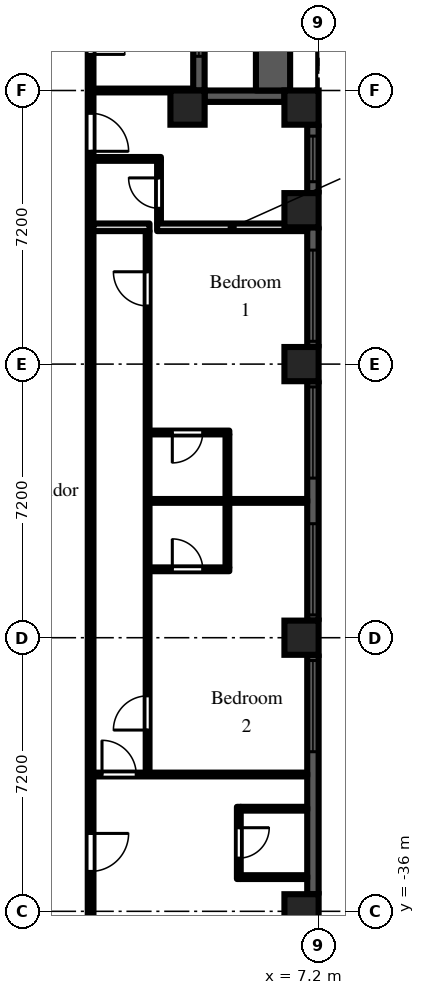
"""IFC4 building model, lengths in metres.
Left out: names, types, materials, properties, quantities, classifications, styles, units other than length and angle.
Written with IfcOpenShell. Run it as: python <this file> out.ifc"""

import sys

from ifc_helpers import new_model, si_unit, direction, frame, frame_2d, origin, origin_2d, place, context, subcontext, project, spatial, rectangle, extrude, element, fill, save


model = new_model("IFC4")
c1 = context("Model", 3, precision=1e-05, world=origin(), true_north=direction((0.0, 1.0)))
c2 = subcontext(c1, "Body", "Model", "MODEL_VIEW")
j1 = project(units=[si_unit("LENGTHUNIT", "METRE"), si_unit("PLANEANGLEUNIT", "RADIAN")], contexts=[c1])
p1 = place(None, origin())
s1 = spatial("IfcSite", under=j1, at=p1, CompositionType="ELEMENT")
p2 = place(p1, origin())
s2 = spatial("IfcBuilding", under=s1, at=p2, CompositionType="ELEMENT")
p3 = place(p2, frame((0.0, 0.0, 84.9)))
s3 = spatial("IfcBuildingStorey", under=s2, at=p3, CompositionType="ELEMENT", Elevation=84.9)
for number, where, z_axis, x_axis in (
    (1, (3.75, -14.85, 0.0), (0.0, 0.0, 1.0), (1.0, 0.0, 0.0)),
    (2, (6.75, -36.0, 0.0), (0.0, 0.0, 1.0), (1.0, 0.0, 0.0)),
    (3, (6.75, -28.8, 0.0), (0.0, 0.0, 1.0), (1.0, 0.0, 0.0)),
    (4, (6.75, -21.6, 0.0), (0.0, 0.0, 1.0), (1.0, 0.0, 0.0)),
    (5, (6.75, -17.55, 0.0), (0.0, 0.0, 1.0), (1.0, 0.0, 0.0)),
    (6, (6.75, -14.85, 0.0), (0.0, 0.0, 1.0), (1.0, 0.0, 0.0)),
):
    element("IfcColumn", number, at=place(p3, frame(where, z_axis=z_axis, x_axis=x_axis)), inside=s3, PredefinedType="COLUMN", context=c2, shape_type="SweptSolid", body=[
        extrude(rectangle(XDim=0.9, YDim=0.9, at=origin_2d()), origin(), (0.0, 0.0, 1.0), 3.0),
    ])
p4 = place(p3, frame((7.05, -35.55, 0.0), z_axis=(0.0, 0.0, 1.0), x_axis=(0.0, 1.0, 0.0)))
e7 = element("IfcWall", 7, at=p4, inside=s3, PredefinedType="SOLIDWALL", context=c2, shape_type="SweptSolid", body=[
    extrude(rectangle(XDim=6.3, YDim=0.3, at=frame_2d((3.15, 0.0))), origin(), (0.0, 0.0, 1.0), 2.1),
])
p5 = place(p4, frame((3.75, 0.0, 0.2)))
e8 = element("IfcOpeningElement", 8, at=p5, cuts=e7, PredefinedType="OPENING", context=c2, shape_type="SweptSolid", body=[
    extrude(rectangle(XDim=2.4, YDim=1.85, at=frame_2d((1.2, 0.925))), frame((0.0, 0.16, 0.0), z_axis=(0.0, -1.0, 0.0), x_axis=(1.0, 0.0, 0.0)), (0.0, 0.0, 1.0), 0.32),
])
p6 = place(p3, frame((7.05, -28.35, 0.0), z_axis=(0.0, 0.0, 1.0), x_axis=(0.0, 1.0, 0.0)))
e9 = element("IfcWall", 9, at=p6, inside=s3, PredefinedType="SOLIDWALL", context=c2, shape_type="SweptSolid", body=[
    extrude(rectangle(XDim=6.3, YDim=0.3, at=frame_2d((3.15, 0.0))), origin(), (0.0, 0.0, 1.0), 2.1),
])
p7 = place(p6, frame((0.15, 0.0, 0.2)))
e10 = element("IfcOpeningElement", 10, at=p7, cuts=e9, PredefinedType="OPENING", context=c2, shape_type="SweptSolid", body=[
    extrude(rectangle(XDim=2.4, YDim=1.85, at=frame_2d((1.2, 0.925))), frame((0.0, 0.16, 0.0), z_axis=(0.0, -1.0, 0.0), x_axis=(1.0, 0.0, 0.0)), (0.0, 0.0, 1.0), 0.32),
])
p8 = place(p6, frame((3.75, 0.0, 0.2)))
e11 = element("IfcOpeningElement", 11, at=p8, cuts=e9, PredefinedType="OPENING", context=c2, shape_type="SweptSolid", body=[
    extrude(rectangle(XDim=2.4, YDim=1.85, at=frame_2d((1.2, 0.925))), frame((0.0, 0.16, 0.0), z_axis=(0.0, -1.0, 0.0), x_axis=(1.0, 0.0, 0.0)), (0.0, 0.0, 1.0), 0.32),
])
p9 = place(p3, frame((7.05, -21.15, 0.0), z_axis=(0.0, 0.0, 1.0), x_axis=(0.0, 1.0, 0.0)))
e12 = element("IfcWall", 12, at=p9, inside=s3, PredefinedType="SOLIDWALL", context=c2, shape_type="SweptSolid", body=[
    extrude(rectangle(XDim=3.15, YDim=0.3, at=frame_2d((1.575, 0.0))), origin(), (0.0, 0.0, 1.0), 2.1),
])
p10 = place(p9, frame((0.15, 0.0, 0.2)))
e13 = element("IfcOpeningElement", 13, at=p10, cuts=e12, PredefinedType="OPENING", context=c2, shape_type="SweptSolid", body=[
    extrude(rectangle(XDim=2.4, YDim=1.85, at=frame_2d((1.2, 0.925))), frame((0.0, 0.16, 0.0), z_axis=(0.0, -1.0, 0.0), x_axis=(1.0, 0.0, 0.0)), (0.0, 0.0, 1.0), 0.32),
])
p11 = place(p3, frame((7.05, -17.1, 0.0), z_axis=(0.0, 0.0, 1.0), x_axis=(0.0, 1.0, 0.0)))
e14 = element("IfcWall", 14, at=p11, inside=s3, PredefinedType="SOLIDWALL", context=c2, shape_type="SweptSolid", body=[
    extrude(rectangle(XDim=1.8, YDim=0.3, at=frame_2d((0.9, 0.0))), origin(), (0.0, 0.0, 1.0), 2.1),
])
p12 = place(p11, frame((0.3, 0.0, 0.2)))
e15 = element("IfcOpeningElement", 15, at=p12, cuts=e14, PredefinedType="OPENING", context=c2, shape_type="SweptSolid", body=[
    extrude(rectangle(XDim=1.2, YDim=1.85, at=frame_2d((0.6, 0.925))), frame((0.0, 0.16, 0.0), z_axis=(0.0, -1.0, 0.0), x_axis=(1.0, 0.0, 0.0)), (0.0, 0.0, 1.0), 0.32),
])
p13 = place(p3, frame((6.3, -14.55, 0.0), z_axis=(0.0, 0.0, 1.0), x_axis=(-1.0, 0.0, 0.0)))
e16 = element("IfcWall", 16, at=p13, inside=s3, PredefinedType="SOLIDWALL", context=c2, shape_type="SweptSolid", body=[
    extrude(rectangle(XDim=2.1, YDim=0.3, at=frame_2d((1.05, 0.0))), origin(), (0.0, 0.0, 1.0), 2.1),
])
p14 = place(p3, frame((4.05, -14.4, 0.0), z_axis=(0.0, 0.0, 1.0), x_axis=(0.0, 1.0, 0.0)))
e17 = element("IfcWall", 17, at=p14, inside=s3, PredefinedType="SOLIDWALL", context=c2, shape_type="SweptSolid", body=[
    extrude(rectangle(XDim=7.2, YDim=0.3, at=frame_2d((3.6, 0.0))), origin(), (0.0, 0.0, 1.0), 2.1),
])
p15 = place(p14, frame((3.0, 0.0, 0.0)))
e18 = element("IfcOpeningElement", 18, at=p15, cuts=e17, PredefinedType="OPENING", context=c2, shape_type="SweptSolid", body=[
    extrude(rectangle(XDim=1.2, YDim=2.05, at=frame_2d((0.6, 1.025))), frame((0.0, 0.16, 0.0), z_axis=(0.0, -1.0, 0.0), x_axis=(1.0, 0.0, 0.0)), (0.0, 0.0, 1.0), 0.32),
])
p16 = place(p14, frame((0.9, 0.0, 0.2)))
e19 = element("IfcOpeningElement", 19, at=p16, cuts=e17, PredefinedType="OPENING", context=c2, shape_type="SweptSolid", body=[
    extrude(rectangle(XDim=1.8, YDim=1.85, at=frame_2d((0.9, 0.925))), frame((0.0, 0.16, 0.0), z_axis=(0.0, -1.0, 0.0), x_axis=(1.0, 0.0, 0.0)), (0.0, 0.0, 1.0), 0.32),
])
p17 = place(p14, frame((4.5, 0.0, 0.2)))
e20 = element("IfcOpeningElement", 20, at=p17, cuts=e17, PredefinedType="OPENING", context=c2, shape_type="SweptSolid", body=[
    extrude(rectangle(XDim=1.8, YDim=1.85, at=frame_2d((0.9, 0.925))), frame((0.0, 0.16, 0.0), z_axis=(0.0, -1.0, 0.0), x_axis=(1.0, 0.0, 0.0)), (0.0, 0.0, 1.0), 0.32),
])
p18 = place(p3, frame((6.0, -14.4, 0.0), z_axis=(0.0, 0.0, 1.0), x_axis=(0.0, 1.0, 0.0)))
e21 = element("IfcWall", 21, at=p18, inside=s3, PredefinedType="PARAPET", context=c2, shape_type="SweptSolid", body=[
    extrude(rectangle(XDim=7.2, YDim=0.9, at=frame_2d((3.6, 0.0))), origin(), (0.0, 0.0, 1.0), 0.8),
])
p19 = place(p3, frame((1.2, -36.5, 0.0), z_axis=(0.0, 0.0, 1.0), x_axis=(0.0, 1.0, 0.0)))
e22 = element("IfcWall", 22, at=p19, inside=s3, PredefinedType="PARTITIONING", context=c2, shape_type="SweptSolid", body=[
    extrude(rectangle(XDim=35.375, YDim=0.15, at=frame_2d((17.688, 0.0))), origin(), (0.0, 0.0, 1.0), 2.575),
])
p20 = place(p19, frame((31.85, 0.0, 0.0)))
e23 = element("IfcOpeningElement", 23, at=p20, cuts=e22, PredefinedType="OPENING", context=c2, shape_type="SweptSolid", body=[
    extrude(rectangle(XDim=0.9, YDim=2.1, at=frame_2d((0.45, 1.05))), frame((0.0, 0.085, 0.0), z_axis=(0.0, -1.0, 0.0), x_axis=(1.0, 0.0, 0.0)), (0.0, 0.0, 1.0), 0.17),
])
p21 = place(p19, frame((23.05, 0.0, 0.0)))
e24 = element("IfcOpeningElement", 24, at=p21, cuts=e22, PredefinedType="OPENING", context=c2, shape_type="SweptSolid", body=[
    extrude(rectangle(XDim=0.9, YDim=2.1, at=frame_2d((0.45, 1.05))), frame((0.0, 0.085, 0.0), z_axis=(0.0, -1.0, 0.0), x_axis=(1.0, 0.0, 0.0)), (0.0, 0.0, 1.0), 0.17),
])
p22 = place(p19, frame((26.65, 0.0, 0.0)))
e25 = element("IfcOpeningElement", 25, at=p22, cuts=e22, PredefinedType="OPENING", context=c2, shape_type="SweptSolid", body=[
    extrude(rectangle(XDim=0.9, YDim=2.1, at=frame_2d((0.45, 1.05))), frame((0.0, 0.085, 0.0), z_axis=(0.0, -1.0, 0.0), x_axis=(1.0, 0.0, 0.0)), (0.0, 0.0, 1.0), 0.17),
])
p23 = place(p19, frame((20.5, 0.0, 0.0)))
e26 = element("IfcOpeningElement", 26, at=p23, cuts=e22, PredefinedType="OPENING", context=c2, shape_type="SweptSolid", body=[
    extrude(rectangle(XDim=1.0, YDim=2.1, at=frame_2d((0.5, 1.05))), frame((0.0, 0.085, 0.0), z_axis=(0.0, -1.0, 0.0), x_axis=(1.0, 0.0, 0.0)), (0.0, 0.0, 1.0), 0.17),
])
p24 = place(p19, frame((1.55, 0.0, 0.0)))
e27 = element("IfcOpeningElement", 27, at=p24, cuts=e22, PredefinedType="OPENING", context=c2, shape_type="SweptSolid", body=[
    extrude(rectangle(XDim=1.0, YDim=2.1, at=frame_2d((0.5, 1.05))), frame((0.0, 0.085, 0.0), z_axis=(0.0, -1.0, 0.0), x_axis=(1.0, 0.0, 0.0)), (0.0, 0.0, 1.0), 0.17),
])
p25 = place(p3, frame((1.275, -32.4, 0.0), z_axis=(0.0, 0.0, 1.0), x_axis=(1.0, 0.0, 0.0)))
e28 = element("IfcWall", 28, at=p25, inside=s3, PredefinedType="PARTITIONING", context=c2, shape_type="SweptSolid", body=[
    extrude(rectangle(XDim=5.625, YDim=0.1, at=frame_2d((2.812, 0.0))), origin(), (0.0, 0.0, 1.0), 2.575),
])
p26 = place(p25, frame((0.225, 0.0, 0.0)))
e29 = element("IfcOpeningElement", 29, at=p26, cuts=e28, PredefinedType="OPENING", context=c2, shape_type="SweptSolid", body=[
    extrude(rectangle(XDim=0.9, YDim=2.1, at=frame_2d((0.45, 1.05))), frame((0.0, 0.06, 0.0), z_axis=(0.0, -1.0, 0.0), x_axis=(1.0, 0.0, 0.0)), (0.0, 0.0, 1.0), 0.12),
])
p27 = place(p3, frame((1.275, -18.0, 0.0), z_axis=(0.0, 0.0, 1.0), x_axis=(1.0, 0.0, 0.0)))
e30 = element("IfcWall", 30, at=p27, inside=s3, PredefinedType="PARTITIONING", context=c2, shape_type="SweptSolid", body=[
    extrude(rectangle(XDim=1.475, YDim=0.2, at=frame_2d((0.738, 0.0))), origin(), (0.0, 0.0, 1.0), 2.575),
])
p28 = place(p3, frame((1.275, -16.2, 0.0), z_axis=(0.0, 0.0, 1.0), x_axis=(1.0, 0.0, 0.0)))
e31 = element("IfcWall", 31, at=p28, inside=s3, PredefinedType="PARTITIONING", context=c2, shape_type="SweptSolid", body=[
    extrude(rectangle(XDim=1.775, YDim=0.1, at=frame_2d((0.888, 0.0))), origin(), (0.0, 0.0, 1.0), 2.575),
])
p29 = place(p3, frame((1.275, -14.4, 0.0), z_axis=(0.0, 0.0, 1.0), x_axis=(1.0, 0.0, 0.0)))
e32 = element("IfcWall", 32, at=p29, inside=s3, PredefinedType="PARTITIONING", context=c2, shape_type="SweptSolid", body=[
    extrude(rectangle(XDim=2.625, YDim=0.1, at=frame_2d((1.312, 0.0))), origin(), (0.0, 0.0, 1.0), 2.575),
])
p30 = place(p3, frame((2.7, -32.35, 0.0), z_axis=(0.0, 0.0, 1.0), x_axis=(0.0, 1.0, 0.0)))
e33 = element("IfcWall", 33, at=p30, inside=s3, PredefinedType="PARTITIONING", context=c2, shape_type="SweptSolid", body=[
    extrude(rectangle(XDim=14.25, YDim=0.1, at=frame_2d((7.125, 0.0))), origin(), (0.0, 0.0, 1.0), 2.575),
])
p31 = place(p30, frame((1.12, 0.0, 0.0)))
e34 = element("IfcOpeningElement", 34, at=p31, cuts=e33, PredefinedType="OPENING", context=c2, shape_type="SweptSolid", body=[
    extrude(rectangle(XDim=0.9, YDim=2.1, at=frame_2d((0.45, 1.05))), frame((0.0, 0.06, 0.0), z_axis=(0.0, -1.0, 0.0), x_axis=(1.0, 0.0, 0.0)), (0.0, 0.0, 1.0), 0.12),
])
p32 = place(p30, frame((12.28, 0.0, 0.0)))
e35 = element("IfcOpeningElement", 35, at=p32, cuts=e33, PredefinedType="OPENING", context=c2, shape_type="SweptSolid", body=[
    extrude(rectangle(XDim=0.9, YDim=2.1, at=frame_2d((0.45, 1.05))), frame((0.0, 0.06, 0.0), z_axis=(0.0, -1.0, 0.0), x_axis=(1.0, 0.0, 0.0)), (0.0, 0.0, 1.0), 0.12),
])
p33 = place(p3, frame((2.75, -27.0, 0.0), z_axis=(0.0, 0.0, 1.0), x_axis=(1.0, 0.0, 0.0)))
e36 = element("IfcWall", 36, at=p33, inside=s3, PredefinedType="PARTITIONING", context=c2, shape_type="SweptSolid", body=[
    extrude(rectangle(XDim=2.1, YDim=0.1, at=frame_2d((1.05, 0.0))), origin(), (0.0, 0.0, 1.0), 2.575),
])
p34 = place(p33, frame((0.6, 0.0, 0.0)))
e37 = element("IfcOpeningElement", 37, at=p34, cuts=e36, PredefinedType="OPENING", context=c2, shape_type="SweptSolid", body=[
    extrude(rectangle(XDim=0.8, YDim=2.1, at=frame_2d((0.4, 1.05))), frame((0.0, 0.06, 0.0), z_axis=(0.0, -1.0, 0.0), x_axis=(1.0, 0.0, 0.0)), (0.0, 0.0, 1.0), 0.12),
])
p35 = place(p3, frame((2.75, -25.2, 0.0), z_axis=(0.0, 0.0, 1.0), x_axis=(1.0, 0.0, 0.0)))
e38 = element("IfcWall", 38, at=p35, inside=s3, PredefinedType="PARTITIONING", context=c2, shape_type="SweptSolid", body=[
    extrude(rectangle(XDim=4.15, YDim=0.1, at=frame_2d((2.075, 0.0))), origin(), (0.0, 0.0, 1.0), 2.575),
])
p36 = place(p3, frame((2.75, -23.4, 0.0), z_axis=(0.0, 0.0, 1.0), x_axis=(1.0, 0.0, 0.0)))
e39 = element("IfcWall", 39, at=p36, inside=s3, PredefinedType="PARTITIONING", context=c2, shape_type="SweptSolid", body=[
    extrude(rectangle(XDim=2.1, YDim=0.1, at=frame_2d((1.05, 0.0))), origin(), (0.0, 0.0, 1.0), 2.575),
])
p37 = place(p36, frame((0.6, 0.0, 0.0)))
e40 = element("IfcOpeningElement", 40, at=p37, cuts=e39, PredefinedType="OPENING", context=c2, shape_type="SweptSolid", body=[
    extrude(rectangle(XDim=0.8, YDim=2.1, at=frame_2d((0.4, 1.05))), frame((0.0, 0.06, 0.0), z_axis=(0.0, -1.0, 0.0), x_axis=(1.0, 0.0, 0.0)), (0.0, 0.0, 1.0), 0.12),
])
p38 = place(p3, frame((3.0, -17.9, 0.0), z_axis=(0.0, 0.0, 1.0), x_axis=(0.0, 1.0, 0.0)))
e41 = element("IfcWall", 41, at=p38, inside=s3, PredefinedType="PARTITIONING", context=c2, shape_type="SweptSolid", body=[
    extrude(rectangle(XDim=1.65, YDim=0.1, at=frame_2d((0.825, 0.0))), origin(), (0.0, 0.0, 1.0), 2.575),
])
p39 = place(p38, frame((0.4, 0.0, 0.0)))
e42 = element("IfcOpeningElement", 42, at=p39, cuts=e41, PredefinedType="OPENING", context=c2, shape_type="SweptSolid", body=[
    extrude(rectangle(XDim=0.8, YDim=2.1, at=frame_2d((0.4, 1.05))), frame((0.0, 0.06, 0.0), z_axis=(0.0, -1.0, 0.0), x_axis=(1.0, 0.0, 0.0)), (0.0, 0.0, 1.0), 0.12),
])
p40 = place(p3, frame((2.95, -18.0, 0.0), z_axis=(0.0, 0.0, 1.0), x_axis=(1.0, 0.0, 0.0)))
e43 = element("IfcWall", 43, at=p40, inside=s3, PredefinedType="PARTITIONING", context=c2, shape_type="SweptSolid", body=[
    extrude(rectangle(XDim=3.95, YDim=0.2, at=frame_2d((1.975, 0.0))), origin(), (0.0, 0.0, 1.0), 2.575),
])
p41 = place(p3, frame((4.8, -26.95, 0.0), z_axis=(0.0, 0.0, 1.0), x_axis=(0.0, 1.0, 0.0)))
e44 = element("IfcWall", 44, at=p41, inside=s3, PredefinedType="PARTITIONING", context=c2, shape_type="SweptSolid", body=[
    extrude(rectangle(XDim=3.5, YDim=0.1, at=frame_2d((1.75, 0.0))), origin(), (0.0, 0.0, 1.0), 2.575),
])
p42 = place(p3, frame((5.1, -35.15, 0.0), z_axis=(0.0, 0.0, 1.0), x_axis=(0.0, 1.0, 0.0)))
e45 = element("IfcWall", 45, at=p42, inside=s3, PredefinedType="PARTITIONING", context=c2, shape_type="SweptSolid", body=[
    extrude(rectangle(XDim=1.9, YDim=0.1, at=frame_2d((0.95, 0.0))), origin(), (0.0, 0.0, 1.0), 2.575),
])
p43 = place(p42, frame((0.55, 0.0, 0.0)))
e46 = element("IfcOpeningElement", 46, at=p43, cuts=e45, PredefinedType="OPENING", context=c2, shape_type="SweptSolid", body=[
    extrude(rectangle(XDim=0.8, YDim=2.1, at=frame_2d((0.4, 1.05))), frame((0.0, 0.06, 0.0), z_axis=(0.0, -1.0, 0.0), x_axis=(1.0, 0.0, 0.0)), (0.0, 0.0, 1.0), 0.12),
])
for number, where, z_axis, x_axis in (
    (47, (5.15, -35.1, 0.0), (0.0, 0.0, 1.0), (1.0, 0.0, 0.0)),
    (48, (5.15, -33.3, 0.0), (0.0, 0.0, 1.0), (1.0, 0.0, 0.0)),
):
    element("IfcWall", number, at=place(p3, frame(where, z_axis=z_axis, x_axis=x_axis)), inside=s3, PredefinedType="PARTITIONING", context=c2, shape_type="SweptSolid", body=[
        extrude(rectangle(XDim=1.75, YDim=0.1, at=frame_2d((0.875, 0.0))), origin(), (0.0, 0.0, 1.0), 2.575),
    ])
p44 = place(p5, origin())
e49 = element("IfcWindow", 49, at=p44, inside=s3, PartitioningType="SINGLE_PANEL", PredefinedType="WINDOW", context=c2, shape_type="SweptSolid", body=[
    extrude(rectangle(XDim=2.4, YDim=1.85, at=frame_2d((1.2, 0.925))), frame((0.0, 0.03, 0.0), z_axis=(0.0, -1.0, 0.0), x_axis=(1.0, 0.0, 0.0)), (0.0, 0.0, 1.0), 0.06),
])
fill(e8, e49)
p45 = place(p7, origin())
e50 = element("IfcWindow", 50, at=p45, inside=s3, PartitioningType="SINGLE_PANEL", PredefinedType="WINDOW", context=c2, shape_type="SweptSolid", body=[
    extrude(rectangle(XDim=2.4, YDim=1.85, at=frame_2d((1.2, 0.925))), frame((0.0, 0.03, 0.0), z_axis=(0.0, -1.0, 0.0), x_axis=(1.0, 0.0, 0.0)), (0.0, 0.0, 1.0), 0.06),
])
fill(e10, e50)
p46 = place(p8, origin())
e51 = element("IfcWindow", 51, at=p46, inside=s3, PartitioningType="SINGLE_PANEL", PredefinedType="WINDOW", context=c2, shape_type="SweptSolid", body=[
    extrude(rectangle(XDim=2.4, YDim=1.85, at=frame_2d((1.2, 0.925))), frame((0.0, 0.03, 0.0), z_axis=(0.0, -1.0, 0.0), x_axis=(1.0, 0.0, 0.0)), (0.0, 0.0, 1.0), 0.06),
])
fill(e11, e51)
p47 = place(p10, origin())
e52 = element("IfcWindow", 52, at=p47, inside=s3, PartitioningType="SINGLE_PANEL", PredefinedType="WINDOW", context=c2, shape_type="SweptSolid", body=[
    extrude(rectangle(XDim=2.4, YDim=1.85, at=frame_2d((1.2, 0.925))), frame((0.0, 0.03, 0.0), z_axis=(0.0, -1.0, 0.0), x_axis=(1.0, 0.0, 0.0)), (0.0, 0.0, 1.0), 0.06),
])
fill(e13, e52)
p48 = place(p12, origin())
e53 = element("IfcWindow", 53, at=p48, inside=s3, PartitioningType="SINGLE_PANEL", PredefinedType="WINDOW", context=c2, shape_type="SweptSolid", body=[
    extrude(rectangle(XDim=1.2, YDim=1.85, at=frame_2d((0.6, 0.925))), frame((0.0, 0.03, 0.0), z_axis=(0.0, -1.0, 0.0), x_axis=(1.0, 0.0, 0.0)), (0.0, 0.0, 1.0), 0.06),
])
fill(e15, e53)
p49 = place(p16, origin())
e54 = element("IfcWindow", 54, at=p49, inside=s3, PartitioningType="SINGLE_PANEL", PredefinedType="WINDOW", context=c2, shape_type="SweptSolid", body=[
    extrude(rectangle(XDim=1.8, YDim=1.85, at=frame_2d((0.9, 0.925))), frame((0.0, 0.03, 0.0), z_axis=(0.0, -1.0, 0.0), x_axis=(1.0, 0.0, 0.0)), (0.0, 0.0, 1.0), 0.06),
])
fill(e19, e54)
p50 = place(p21, frame((0.9, 0.0, 0.0), z_axis=(0.0, 0.0, 1.0), x_axis=(-1.0, 0.0, 0.0)))
e55 = element("IfcDoor", 55, at=p50, inside=s3, OperationType="SINGLE_SWING_RIGHT", PredefinedType="DOOR", context=c2, shape_type="SweptSolid", body=[
    extrude(rectangle(XDim=0.9, YDim=2.1, at=frame_2d((0.45, 1.05))), frame((0.0, 0.025, 0.0), z_axis=(0.0, -1.0, 0.0), x_axis=(1.0, 0.0, 0.0)), (0.0, 0.0, 1.0), 0.05),
])
fill(e24, e55)
p51 = place(p39, origin())
e56 = element("IfcDoor", 56, at=p51, inside=s3, OperationType="SINGLE_SWING_RIGHT", PredefinedType="DOOR", context=c2, shape_type="SweptSolid", body=[
    extrude(rectangle(XDim=0.8, YDim=2.1, at=frame_2d((0.4, 1.05))), frame((0.0, 0.025, 0.0), z_axis=(0.0, -1.0, 0.0), x_axis=(1.0, 0.0, 0.0)), (0.0, 0.0, 1.0), 0.05),
])
fill(e42, e56)
p52 = place(p23, frame((1.0, 0.0, 0.0), z_axis=(0.0, 0.0, 1.0), x_axis=(-1.0, 0.0, 0.0)))
e57 = element("IfcDoor", 57, at=p52, inside=s3, OperationType="SINGLE_SWING_RIGHT", PredefinedType="DOOR", context=c2, shape_type="SweptSolid", body=[
    extrude(rectangle(XDim=1.0, YDim=2.1, at=frame_2d((0.5, 1.05))), frame((0.0, 0.025, 0.0), z_axis=(0.0, -1.0, 0.0), x_axis=(1.0, 0.0, 0.0)), (0.0, 0.0, 1.0), 0.05),
])
fill(e26, e57)
p53 = place(p43, frame((0.8, 0.0, 0.0), z_axis=(0.0, 0.0, 1.0), x_axis=(-1.0, 0.0, 0.0)))
e58 = element("IfcDoor", 58, at=p53, inside=s3, OperationType="SINGLE_SWING_LEFT", PredefinedType="DOOR", context=c2, shape_type="SweptSolid", body=[
    extrude(rectangle(XDim=0.8, YDim=2.1, at=frame_2d((0.4, 1.05))), frame((0.0, 0.025, 0.0), z_axis=(0.0, -1.0, 0.0), x_axis=(1.0, 0.0, 0.0)), (0.0, 0.0, 1.0), 0.05),
])
fill(e46, e58)
p54 = place(p24, frame((1.0, 0.0, 0.0), z_axis=(0.0, 0.0, 1.0), x_axis=(-1.0, 0.0, 0.0)))
e59 = element("IfcDoor", 59, at=p54, inside=s3, OperationType="SINGLE_SWING_LEFT", PredefinedType="DOOR", context=c2, shape_type="SweptSolid", body=[
    extrude(rectangle(XDim=1.0, YDim=2.1, at=frame_2d((0.5, 1.05))), frame((0.0, 0.025, 0.0), z_axis=(0.0, -1.0, 0.0), x_axis=(1.0, 0.0, 0.0)), (0.0, 0.0, 1.0), 0.05),
])
fill(e27, e59)
p55 = place(p26, origin())
e60 = element("IfcDoor", 60, at=p55, inside=s3, OperationType="SINGLE_SWING_LEFT", PredefinedType="DOOR", context=c2, shape_type="SweptSolid", body=[
    extrude(rectangle(XDim=0.9, YDim=2.1, at=frame_2d((0.45, 1.05))), frame((0.0, 0.025, 0.0), z_axis=(0.0, -1.0, 0.0), x_axis=(1.0, 0.0, 0.0)), (0.0, 0.0, 1.0), 0.05),
])
fill(e29, e60)
p56 = place(p31, origin())
e61 = element("IfcDoor", 61, at=p56, inside=s3, OperationType="SINGLE_SWING_LEFT", PredefinedType="DOOR", context=c2, shape_type="SweptSolid", body=[
    extrude(rectangle(XDim=0.9, YDim=2.1, at=frame_2d((0.45, 1.05))), frame((0.0, 0.025, 0.0), z_axis=(0.0, -1.0, 0.0), x_axis=(1.0, 0.0, 0.0)), (0.0, 0.0, 1.0), 0.05),
])
fill(e34, e61)
p57 = place(p32, origin())
e62 = element("IfcDoor", 62, at=p57, inside=s3, OperationType="SINGLE_SWING_RIGHT", PredefinedType="DOOR", context=c2, shape_type="SweptSolid", body=[
    extrude(rectangle(XDim=0.9, YDim=2.1, at=frame_2d((0.45, 1.05))), frame((0.0, 0.025, 0.0), z_axis=(0.0, -1.0, 0.0), x_axis=(1.0, 0.0, 0.0)), (0.0, 0.0, 1.0), 0.05),
])
fill(e35, e62)
p58 = place(p37, frame((0.8, 0.0, 0.0), z_axis=(0.0, 0.0, 1.0), x_axis=(-1.0, 0.0, 0.0)))
e63 = element("IfcDoor", 63, at=p58, inside=s3, OperationType="SINGLE_SWING_RIGHT", PredefinedType="DOOR", context=c2, shape_type="SweptSolid", body=[
    extrude(rectangle(XDim=0.8, YDim=2.1, at=frame_2d((0.4, 1.05))), frame((0.0, 0.025, 0.0), z_axis=(0.0, -1.0, 0.0), x_axis=(1.0, 0.0, 0.0)), (0.0, 0.0, 1.0), 0.05),
])
fill(e40, e63)
p59 = place(p34, origin())
e64 = element("IfcDoor", 64, at=p59, inside=s3, OperationType="SINGLE_SWING_LEFT", PredefinedType="DOOR", context=c2, shape_type="SweptSolid", body=[
    extrude(rectangle(XDim=0.8, YDim=2.1, at=frame_2d((0.4, 1.05))), frame((0.0, 0.025, 0.0), z_axis=(0.0, -1.0, 0.0), x_axis=(1.0, 0.0, 0.0)), (0.0, 0.0, 1.0), 0.05),
])
fill(e37, e64)
save(model, sys.argv[1])
